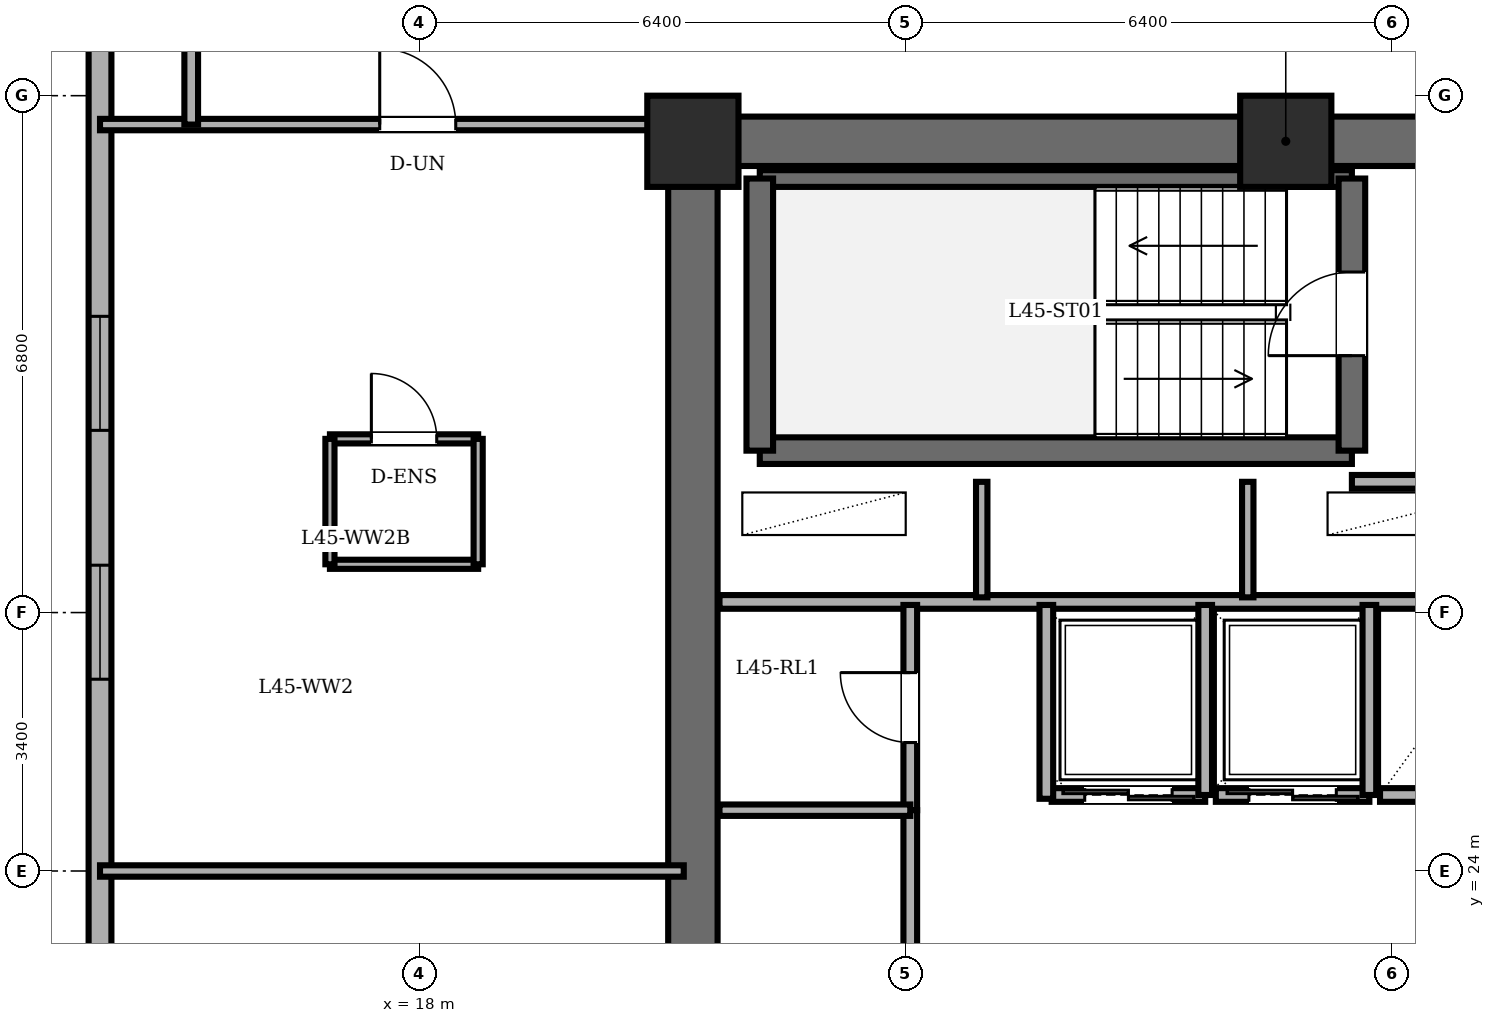
"""IFC4 building model, lengths in metres.
Left out: names, types, materials, properties, quantities, classifications, styles, units other than length and angle.
Written with IfcOpenShell. Run it as: python <this file> out.ifc"""

import sys

from ifc_helpers import new_model, si_unit, direction, frame, frame_2d, origin, origin_2d, place, context, subcontext, project, spatial, rectangle, extrude, element, fill, save


model = new_model("IFC4")
c1 = context("Model", 3, precision=1e-05, world=origin(), true_north=direction((0.0, 1.0)))
c2 = subcontext(c1, "Body", "Model", "MODEL_VIEW")
j1 = project(units=[si_unit("LENGTHUNIT", "METRE"), si_unit("PLANEANGLEUNIT", "RADIAN")], contexts=[c1])
p1 = place(None, origin())
s1 = spatial("IfcSite", under=j1, at=p1, CompositionType="ELEMENT")
p2 = place(p1, origin())
s2 = spatial("IfcBuilding", under=s1, at=p2, CompositionType="ELEMENT")
p3 = place(p2, frame((0.0, 0.0, 172.6)))
s3 = spatial("IfcBuildingStorey", under=s2, at=p3, CompositionType="ELEMENT", Elevation=172.6)
for number, where, z_axis, x_axis in (
    (1, (29.4, 33.6, 0.0), (0.0, 0.0, 1.0), (1.0, 0.0, 0.0)),
    (2, (21.6, 33.6, 0.0), (0.0, 0.0, 1.0), (1.0, 0.0, 0.0)),
):
    element("IfcColumn", number, at=place(p3, frame(where, z_axis=z_axis, x_axis=x_axis)), inside=s3, PredefinedType="COLUMN", context=c2, shape_type="SweptSolid", body=[
        extrude(rectangle(XDim=1.2, YDim=1.2, at=origin_2d()), origin(), (0.0, 0.0, 1.0), 3.6),
    ])
p4 = place(p3, frame((13.8, 36.3, 0.0), z_axis=(0.0, 0.0, 1.0), x_axis=(0.0, -1.0, 0.0)))
e3 = element("IfcWall", 3, at=p4, inside=s3, PredefinedType="SOLIDWALL", context=c2, shape_type="SweptSolid", body=[
    extrude(rectangle(XDim=24.6, YDim=0.3, at=frame_2d((12.3, 0.0))), origin(), (0.0, 0.0, 1.0), 3.4),
])
p5 = place(p4, frame((5.003, 0.0, 0.85)))
e4 = element("IfcOpeningElement", 4, at=p5, cuts=e3, PredefinedType="OPENING", context=c2, shape_type="SweptSolid", body=[
    extrude(rectangle(XDim=1.5, YDim=1.55, at=frame_2d((0.75, 0.775))), frame((0.0, 0.16, 0.0), z_axis=(0.0, -1.0, 0.0), x_axis=(1.0, 0.0, 0.0)), (0.0, 0.0, 1.0), 0.32),
])
p6 = place(p4, frame((8.277, 0.0, 0.85)))
e5 = element("IfcOpeningElement", 5, at=p6, cuts=e3, PredefinedType="OPENING", context=c2, shape_type="SweptSolid", body=[
    extrude(rectangle(XDim=1.5, YDim=1.55, at=frame_2d((0.75, 0.775))), frame((0.0, 0.16, 0.0), z_axis=(0.0, -1.0, 0.0), x_axis=(1.0, 0.0, 0.0)), (0.0, 0.0, 1.0), 0.32),
])
p7 = place(p4, frame((14.823, 0.0, 0.85)))
e6 = element("IfcOpeningElement", 6, at=p7, cuts=e3, PredefinedType="OPENING", context=c2, shape_type="SweptSolid", body=[
    extrude(rectangle(XDim=1.5, YDim=1.55, at=frame_2d((0.75, 0.775))), frame((0.0, 0.16, 0.0), z_axis=(0.0, -1.0, 0.0), x_axis=(1.0, 0.0, 0.0)), (0.0, 0.0, 1.0), 0.32),
])
p8 = place(p4, frame((18.097, 0.0, 0.85)))
e7 = element("IfcOpeningElement", 7, at=p8, cuts=e3, PredefinedType="OPENING", context=c2, shape_type="SweptSolid", body=[
    extrude(rectangle(XDim=1.5, YDim=1.55, at=frame_2d((0.75, 0.775))), frame((0.0, 0.16, 0.0), z_axis=(0.0, -1.0, 0.0), x_axis=(1.0, 0.0, 0.0)), (0.0, 0.0, 1.0), 0.32),
])
p9 = place(p3, frame((21.6, 14.4, 0.0), z_axis=(0.0, 0.0, 1.0), x_axis=(0.0, 1.0, 0.0)))
e8 = element("IfcWall", 8, at=p9, inside=s3, PredefinedType="SHEAR", context=c2, shape_type="SweptSolid", body=[
    extrude(rectangle(XDim=19.2, YDim=0.65, at=frame_2d((9.6, 0.0))), origin(), (0.0, 0.0, 1.0), 3.4),
])
p10 = place(p3, frame((21.6, 33.6, 0.0), z_axis=(0.0, 0.0, 1.0), x_axis=(1.0, 0.0, 0.0)))
e9 = element("IfcWall", 9, at=p10, inside=s3, PredefinedType="SHEAR", context=c2, shape_type="SweptSolid", body=[
    extrude(rectangle(XDim=15.6, YDim=0.65, at=frame_2d((7.8, 0.0))), origin(), (0.0, 0.0, 1.0), 3.4),
])
p11 = place(p3, frame((22.48, 29.53, 0.0), z_axis=(0.0, 0.0, 1.0), x_axis=(1.0, 0.0, 0.0)))
e10 = element("IfcWall", 10, at=p11, inside=s3, PredefinedType="SOLIDWALL", context=c2, shape_type="SweptSolid", body=[
    extrude(rectangle(XDim=7.79, YDim=0.35, at=frame_2d((3.895, 0.0))), origin(), (0.0, 0.0, 1.0), 3.4),
])
p12 = place(p3, frame((22.48, 33.11, 0.0), z_axis=(0.0, 0.0, 1.0), x_axis=(1.0, 0.0, 0.0)))
e11 = element("IfcWall", 11, at=p12, inside=s3, PredefinedType="PARTITIONING", context=c2, shape_type="SweptSolid", body=[
    extrude(rectangle(XDim=7.79, YDim=0.22, at=frame_2d((3.895, 0.0))), origin(), (0.0, 0.0, 1.0), 3.4),
])
p13 = place(p3, frame((22.48, 29.53, 0.0), z_axis=(0.0, 0.0, 1.0), x_axis=(0.0, 1.0, 0.0)))
e12 = element("IfcWall", 12, at=p13, inside=s3, PredefinedType="SOLIDWALL", context=c2, shape_type="SweptSolid", body=[
    extrude(rectangle(XDim=3.58, YDim=0.35, at=frame_2d((1.79, 0.0))), origin(), (0.0, 0.0, 1.0), 3.4),
])
p14 = place(p3, frame((30.27, 29.53, 0.0), z_axis=(0.0, 0.0, 1.0), x_axis=(0.0, 1.0, 0.0)))
e13 = element("IfcWall", 13, at=p14, inside=s3, PredefinedType="SOLIDWALL", context=c2, shape_type="SweptSolid", body=[
    extrude(rectangle(XDim=3.58, YDim=0.35, at=frame_2d((1.79, 0.0))), origin(), (0.0, 0.0, 1.0), 3.4),
])
p15 = place(p14, frame((1.25, 0.0, 0.0)))
e14 = element("IfcOpeningElement", 14, at=p15, cuts=e13, PredefinedType="OPENING", context=c2, shape_type="SweptSolid", body=[
    extrude(rectangle(XDim=1.1, YDim=2.15, at=frame_2d((0.55, 1.075))), frame((0.0, 0.185, 0.0), z_axis=(0.0, -1.0, 0.0), x_axis=(1.0, 0.0, 0.0)), (0.0, 0.0, 1.0), 0.37),
])
p16 = place(p3, frame((30.27, 29.12, 0.0), z_axis=(0.0, 0.0, 1.0), x_axis=(1.0, 0.0, 0.0)))
e15 = element("IfcWall", 15, at=p16, inside=s3, PredefinedType="PARTITIONING", context=c2, shape_type="SweptSolid", body=[
    extrude(rectangle(XDim=2.24, YDim=0.18, at=frame_2d((1.12, 0.0))), origin(), (0.0, 0.0, 1.0), 3.4),
])
p17 = place(p3, frame((21.95, 27.54, 0.0), z_axis=(0.0, 0.0, 1.0), x_axis=(1.0, 0.0, 0.0)))
e16 = element("IfcWall", 16, at=p17, inside=s3, PredefinedType="PARTITIONING", context=c2, shape_type="SweptSolid", body=[
    extrude(rectangle(XDim=10.56, YDim=0.18, at=frame_2d((5.28, 0.0))), origin(), (0.0, 0.0, 1.0), 3.4),
])
for number, where, z_axis, x_axis in (
    (17, (25.4, 27.6, 0.0), (0.0, 0.0, 1.0), (0.0, 1.0, 0.0)),
    (18, (28.9, 27.6, 0.0), (0.0, 0.0, 1.0), (0.0, 1.0, 0.0)),
):
    element("IfcWall", number, at=place(p3, frame(where, z_axis=z_axis, x_axis=x_axis)), inside=s3, PredefinedType="PARTITIONING", context=c2, shape_type="SweptSolid", body=[
        extrude(rectangle(XDim=1.52, YDim=0.15, at=frame_2d((0.76, 0.0))), origin(), (0.0, 0.0, 1.0), 3.4),
    ])
p18 = place(p3, frame((28.34, 25.0, 0.0), z_axis=(0.0, 0.0, 1.0), x_axis=(-1.0, 0.0, 0.0)))
e19 = element("IfcWall", 19, at=p18, inside=s3, PredefinedType="PARTITIONING", context=c2, shape_type="SweptSolid", body=[
    extrude(rectangle(XDim=2.02, YDim=0.18, at=frame_2d((1.01, 0.0))), origin(), (0.0, 0.0, 1.0), 3.4),
])
p19 = place(p18, frame((0.435, 0.0, 0.0)))
e20 = element("IfcOpeningElement", 20, at=p19, cuts=e19, PredefinedType="OPENING", context=c2, shape_type="SweptSolid", body=[
    extrude(rectangle(XDim=1.15, YDim=2.2, at=frame_2d((0.575, 1.1))), frame((0.0, 0.1, 0.0), z_axis=(0.0, -1.0, 0.0), x_axis=(1.0, 0.0, 0.0)), (0.0, 0.0, 1.0), 0.2),
])
p20 = place(p3, frame((28.34, 25.0, 0.0), z_axis=(0.0, 0.0, 1.0), x_axis=(0.0, 1.0, 0.0)))
e21 = element("IfcWall", 21, at=p20, inside=s3, PredefinedType="PARTITIONING", context=c2, shape_type="SweptSolid", body=[
    extrude(rectangle(XDim=2.5, YDim=0.18, at=frame_2d((1.25, 0.0))), origin(), (0.0, 0.0, 1.0), 3.4),
])
p21 = place(p3, frame((30.5, 25.0, 0.0), z_axis=(0.0, 0.0, 1.0), x_axis=(-1.0, 0.0, 0.0)))
e22 = element("IfcWall", 22, at=p21, inside=s3, PredefinedType="PARTITIONING", context=c2, shape_type="SweptSolid", body=[
    extrude(rectangle(XDim=2.02, YDim=0.18, at=frame_2d((1.01, 0.0))), origin(), (0.0, 0.0, 1.0), 3.4),
])
p22 = place(p21, frame((0.435, 0.0, 0.0)))
e23 = element("IfcOpeningElement", 23, at=p22, cuts=e22, PredefinedType="OPENING", context=c2, shape_type="SweptSolid", body=[
    extrude(rectangle(XDim=1.15, YDim=2.2, at=frame_2d((0.575, 1.1))), frame((0.0, 0.1, 0.0), z_axis=(0.0, -1.0, 0.0), x_axis=(1.0, 0.0, 0.0)), (0.0, 0.0, 1.0), 0.2),
])
p23 = place(p3, frame((30.5, 25.0, 0.0), z_axis=(0.0, 0.0, 1.0), x_axis=(0.0, 1.0, 0.0)))
e24 = element("IfcWall", 24, at=p23, inside=s3, PredefinedType="PARTITIONING", context=c2, shape_type="SweptSolid", body=[
    extrude(rectangle(XDim=2.5, YDim=0.18, at=frame_2d((1.25, 0.0))), origin(), (0.0, 0.0, 1.0), 3.4),
])
p24 = place(p3, frame((32.46, 25.0, 0.0), z_axis=(0.0, 0.0, 1.0), x_axis=(-1.0, 0.0, 0.0)))
e25 = element("IfcWall", 25, at=p24, inside=s3, PredefinedType="PARTITIONING", context=c2, shape_type="SweptSolid", body=[
    extrude(rectangle(XDim=1.82, YDim=0.18, at=frame_2d((0.91, 0.0))), origin(), (0.0, 0.0, 1.0), 3.4),
])
p25 = place(p3, frame((24.46, 24.8, 0.0), z_axis=(0.0, 0.0, 1.0), x_axis=(0.0, 1.0, 0.0)))
e26 = element("IfcWall", 26, at=p25, inside=s3, PredefinedType="PARTITIONING", context=c2, shape_type="SweptSolid", body=[
    extrude(rectangle(XDim=2.7, YDim=0.18, at=frame_2d((1.35, 0.0))), origin(), (0.0, 0.0, 1.0), 3.4),
])
p26 = place(p25, frame((0.89, 0.0, 0.0)))
e27 = element("IfcOpeningElement", 27, at=p26, cuts=e26, PredefinedType="OPENING", context=c2, shape_type="SweptSolid", body=[
    extrude(rectangle(XDim=0.92, YDim=2.1, at=frame_2d((0.46, 1.05))), frame((0.0, 0.1, 0.0), z_axis=(0.0, -1.0, 0.0), x_axis=(1.0, 0.0, 0.0)), (0.0, 0.0, 1.0), 0.2),
])
p27 = place(p3, frame((24.46, 19.8, 0.0), z_axis=(0.0, 0.0, 1.0), x_axis=(0.0, 1.0, 0.0)))
e28 = element("IfcWall", 28, at=p27, inside=s3, PredefinedType="PARTITIONING", context=c2, shape_type="SweptSolid", body=[
    extrude(rectangle(XDim=5.0, YDim=0.18, at=frame_2d((2.5, 0.0))), origin(), (0.0, 0.0, 1.0), 3.4),
])
p28 = place(p27, frame((2.04, 0.0, 0.0)))
e29 = element("IfcOpeningElement", 29, at=p28, cuts=e28, PredefinedType="OPENING", context=c2, shape_type="SweptSolid", body=[
    extrude(rectangle(XDim=0.92, YDim=2.1, at=frame_2d((0.46, 1.05))), frame((0.0, 0.1, 0.0), z_axis=(0.0, -1.0, 0.0), x_axis=(1.0, 0.0, 0.0)), (0.0, 0.0, 1.0), 0.2),
])
p29 = place(p3, frame((21.95, 24.8, 0.0), z_axis=(0.0, 0.0, 1.0), x_axis=(1.0, 0.0, 0.0)))
e30 = element("IfcWall", 30, at=p29, inside=s3, PredefinedType="PARTITIONING", context=c2, shape_type="SweptSolid", body=[
    extrude(rectangle(XDim=2.51, YDim=0.15, at=frame_2d((1.255, 0.0))), origin(), (0.0, 0.0, 1.0), 3.4),
])
p30 = place(p3, frame((26.25, 24.95, 0.0), z_axis=(0.0, 0.0, 1.0), x_axis=(0.0, 1.0, 0.0)))
e31 = element("IfcWall", 31, at=p30, inside=s3, PredefinedType="PARTITIONING", context=c2, shape_type="SweptSolid", body=[
    extrude(rectangle(XDim=2.55, YDim=0.18, at=frame_2d((1.275, 0.0))), origin(), (0.0, 0.0, 1.0), 3.4),
])
p31 = place(p3, frame((16.825, 29.685, 0.0), z_axis=(0.0, 0.0, 1.0), x_axis=(1.0, 0.0, 0.0)))
e32 = element("IfcWall", 32, at=p31, inside=s3, PredefinedType="PARTITIONING", context=c2, shape_type="SweptSolid", body=[
    extrude(rectangle(XDim=1.95, YDim=0.12, at=frame_2d((0.975, 0.0))), origin(), (0.0, 0.0, 1.0), 3.4),
])
p32 = place(p31, frame((0.545, 0.0, 0.0)))
e33 = element("IfcOpeningElement", 33, at=p32, cuts=e32, PredefinedType="OPENING", context=c2, shape_type="SweptSolid", body=[
    extrude(rectangle(XDim=0.86, YDim=2.1, at=frame_2d((0.43, 1.05))), frame((0.0, 0.07, 0.0), z_axis=(0.0, -1.0, 0.0), x_axis=(1.0, 0.0, 0.0)), (0.0, 0.0, 1.0), 0.14),
])
p33 = place(p3, frame((18.775, 28.035, 0.0), z_axis=(0.0, 0.0, 1.0), x_axis=(-1.0, 0.0, 0.0)))
e34 = element("IfcWall", 34, at=p33, inside=s3, PredefinedType="PARTITIONING", context=c2, shape_type="SweptSolid", body=[
    extrude(rectangle(XDim=1.95, YDim=0.12, at=frame_2d((0.975, 0.0))), origin(), (0.0, 0.0, 1.0), 3.4),
])
for number, where, z_axis, x_axis in (
    (35, (16.825, 29.685, 0.0), (0.0, 0.0, 1.0), (0.0, -1.0, 0.0)),
    (36, (18.775, 28.035, 0.0), (0.0, 0.0, 1.0), (0.0, 1.0, 0.0)),
):
    element("IfcWall", number, at=place(p3, frame(where, z_axis=z_axis, x_axis=x_axis)), inside=s3, PredefinedType="PARTITIONING", context=c2, shape_type="SweptSolid", body=[
        extrude(rectangle(XDim=1.65, YDim=0.12, at=frame_2d((0.825, 0.0))), origin(), (0.0, 0.0, 1.0), 3.4),
    ])
p34 = place(p3, frame((13.8, 24.0, 0.0), z_axis=(0.0, 0.0, 1.0), x_axis=(1.0, 0.0, 0.0)))
e37 = element("IfcWall", 37, at=p34, inside=s3, PredefinedType="PARTITIONING", context=c2, shape_type="SweptSolid", body=[
    extrude(rectangle(XDim=7.68, YDim=0.15, at=frame_2d((3.84, 0.0))), origin(), (0.0, 0.0, 1.0), 3.4),
])
p35 = place(p3, frame((13.8, 33.82, 0.0), z_axis=(0.0, 0.0, 1.0), x_axis=(1.0, 0.0, 0.0)))
e38 = element("IfcWall", 38, at=p35, inside=s3, PredefinedType="PARTITIONING", context=c2, shape_type="SweptSolid", body=[
    extrude(rectangle(XDim=7.68, YDim=0.15, at=frame_2d((3.84, 0.0))), origin(), (0.0, 0.0, 1.0), 3.4),
])
p36 = place(p35, frame((3.68, 0.0, 0.0)))
e39 = element("IfcOpeningElement", 39, at=p36, cuts=e38, PredefinedType="OPENING", context=c2, shape_type="SweptSolid", body=[
    extrude(rectangle(XDim=1.0, YDim=2.15, at=frame_2d((0.5, 1.075))), frame((0.0, 0.085, 0.0), z_axis=(0.0, -1.0, 0.0), x_axis=(1.0, 0.0, 0.0)), (0.0, 0.0, 1.0), 0.17),
])
p37 = place(p3, frame((15.0, 33.82, 0.0), z_axis=(0.0, 0.0, 1.0), x_axis=(0.0, 1.0, 0.0)))
e40 = element("IfcWall", 40, at=p37, inside=s3, PredefinedType="PARTITIONING", context=c2, shape_type="SweptSolid", body=[
    extrude(rectangle(XDim=5.693, YDim=0.18, at=frame_2d((2.846, 0.0))), origin(), (0.0, 0.0, 1.0), 3.4),
])
p38 = place(p5, origin())
e41 = element("IfcWindow", 41, at=p38, inside=s3, PartitioningType="DOUBLE_PANEL_VERTICAL", PredefinedType="WINDOW", context=c2, shape_type="SweptSolid", body=[
    extrude(rectangle(XDim=1.5, YDim=1.55, at=frame_2d((0.75, 0.775))), frame((0.0, 0.03, 0.0), z_axis=(0.0, -1.0, 0.0), x_axis=(1.0, 0.0, 0.0)), (0.0, 0.0, 1.0), 0.06),
])
fill(e4, e41)
p39 = place(p6, origin())
e42 = element("IfcWindow", 42, at=p39, inside=s3, PartitioningType="DOUBLE_PANEL_VERTICAL", PredefinedType="WINDOW", context=c2, shape_type="SweptSolid", body=[
    extrude(rectangle(XDim=1.5, YDim=1.55, at=frame_2d((0.75, 0.775))), frame((0.0, 0.03, 0.0), z_axis=(0.0, -1.0, 0.0), x_axis=(1.0, 0.0, 0.0)), (0.0, 0.0, 1.0), 0.06),
])
fill(e5, e42)
p40 = place(p15, origin())
e43 = element("IfcDoor", 43, at=p40, inside=s3, OperationType="SINGLE_SWING_LEFT", PredefinedType="DOOR", context=c2, shape_type="SweptSolid", body=[
    extrude(rectangle(XDim=1.1, YDim=2.15, at=frame_2d((0.55, 1.075))), frame((0.0, 0.025, 0.0), z_axis=(0.0, -1.0, 0.0), x_axis=(1.0, 0.0, 0.0)), (0.0, 0.0, 1.0), 0.05),
])
fill(e14, e43)
p41 = place(p19, origin())
e44 = element("IfcDoor", 44, at=p41, inside=s3, OperationType="DOUBLE_DOOR_SLIDING", PredefinedType="DOOR", context=c2, shape_type="SweptSolid", body=[
    extrude(rectangle(XDim=1.15, YDim=2.2, at=frame_2d((0.575, 1.1))), frame((0.0, 0.025, 0.0), z_axis=(0.0, -1.0, 0.0), x_axis=(1.0, 0.0, 0.0)), (0.0, 0.0, 1.0), 0.05),
])
fill(e20, e44)
p42 = place(p22, origin())
e45 = element("IfcDoor", 45, at=p42, inside=s3, OperationType="DOUBLE_DOOR_SLIDING", PredefinedType="DOOR", context=c2, shape_type="SweptSolid", body=[
    extrude(rectangle(XDim=1.15, YDim=2.2, at=frame_2d((0.575, 1.1))), frame((0.0, 0.025, 0.0), z_axis=(0.0, -1.0, 0.0), x_axis=(1.0, 0.0, 0.0)), (0.0, 0.0, 1.0), 0.05),
])
fill(e23, e45)
p43 = place(p26, origin())
e46 = element("IfcDoor", 46, at=p43, inside=s3, OperationType="SINGLE_SWING_RIGHT", PredefinedType="DOOR", context=c2, shape_type="SweptSolid", body=[
    extrude(rectangle(XDim=0.92, YDim=2.1, at=frame_2d((0.46, 1.05))), frame((0.0, 0.025, 0.0), z_axis=(0.0, -1.0, 0.0), x_axis=(1.0, 0.0, 0.0)), (0.0, 0.0, 1.0), 0.05),
])
fill(e27, e46)
p44 = place(p32, origin())
e47 = element("IfcDoor", 47, at=p44, inside=s3, OperationType="SINGLE_SWING_LEFT", PredefinedType="DOOR", context=c2, shape_type="SweptSolid", body=[
    extrude(rectangle(XDim=0.86, YDim=2.1, at=frame_2d((0.43, 1.05))), frame((0.0, 0.025, 0.0), z_axis=(0.0, -1.0, 0.0), x_axis=(1.0, 0.0, 0.0)), (0.0, 0.0, 1.0), 0.05),
])
fill(e33, e47)
p45 = place(p36, origin())
e48 = element("IfcDoor", 48, at=p45, inside=s3, OperationType="SINGLE_SWING_LEFT", PredefinedType="DOOR", context=c2, shape_type="SweptSolid", body=[
    extrude(rectangle(XDim=1.0, YDim=2.15, at=frame_2d((0.5, 1.075))), frame((0.0, 0.025, 0.0), z_axis=(0.0, -1.0, 0.0), x_axis=(1.0, 0.0, 0.0)), (0.0, 0.0, 1.0), 0.05),
])
fill(e39, e48)
save(model, sys.argv[1])
